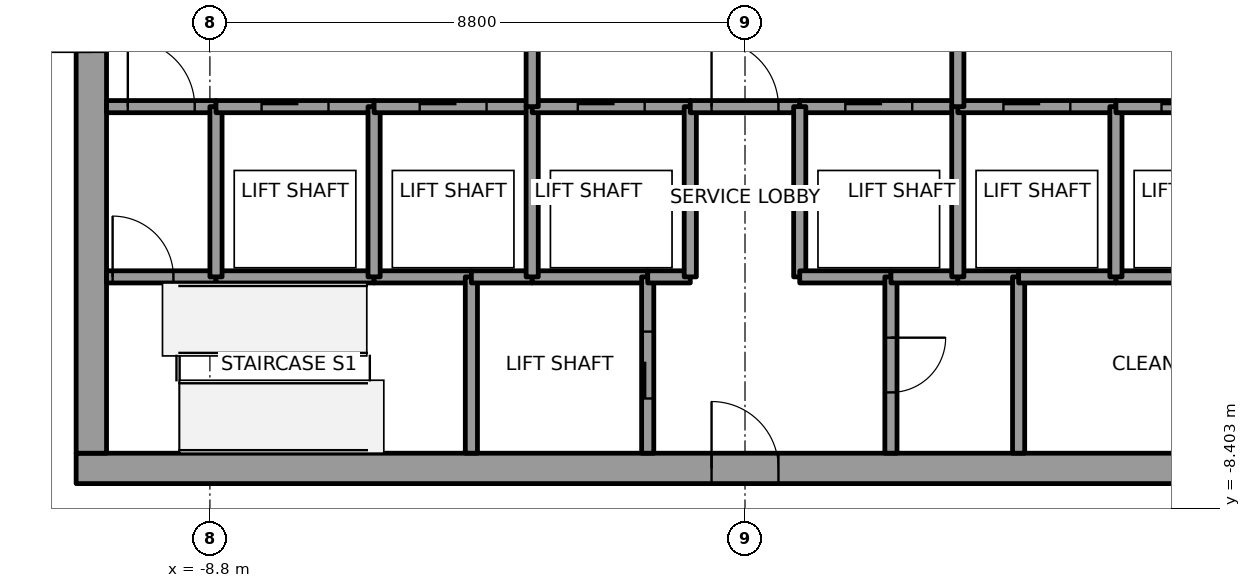
"""IFC4 building model, lengths in metres.
Left out: names, types, materials, properties, quantities, classifications, styles, units other than length and angle.
Written with IfcOpenShell. Run it as: python <this file> out.ifc"""

import sys

from ifc_helpers import new_model, si_unit, direction, frame, frame_2d, origin, place, context, subcontext, project, spatial, rectangle, extrude, element, fill, save


model = new_model("IFC4")
c1 = context("Model", 3, precision=1e-05, world=origin(), true_north=direction((0.0, 1.0)))
c2 = subcontext(c1, "Body", "Model", "MODEL_VIEW")
j1 = project(units=[si_unit("LENGTHUNIT", "METRE"), si_unit("PLANEANGLEUNIT", "RADIAN")], contexts=[c1])
p1 = place(None, origin())
s1 = spatial("IfcSite", under=j1, at=p1, CompositionType="ELEMENT")
p2 = place(p1, origin())
s2 = spatial("IfcBuilding", under=s1, at=p2, CompositionType="ELEMENT")
p3 = place(p2, frame((0.0, 0.0, 295.0)))
s3 = spatial("IfcBuildingStorey", under=s2, at=p3, CompositionType="ELEMENT", Elevation=295.0)
p4 = place(p3, frame((-11.0, -7.75, 0.0), z_axis=(0.0, 0.0, 1.0), x_axis=(1.0, 0.0, 0.0)))
e1 = element("IfcWall", 1, at=p4, inside=s3, PredefinedType="SHEAR", context=c2, shape_type="SweptSolid", body=[
    extrude(rectangle(XDim=22.0, YDim=0.5, at=frame_2d((11.0, 0.0))), origin(), (0.0, 0.0, 1.0), 4.0),
])
p5 = place(p4, frame((10.45, 0.0, 0.0)))
e2 = element("IfcOpeningElement", 2, at=p5, cuts=e1, PredefinedType="OPENING", context=c2, shape_type="SweptSolid", body=[
    extrude(rectangle(XDim=1.1, YDim=2.1, at=frame_2d((0.55, 1.05))), frame((0.0, 0.25, 0.0), z_axis=(0.0, -1.0, 0.0), x_axis=(1.0, 0.0, 0.0)), (0.0, 0.0, 1.0), 0.5),
])
p6 = place(p3, frame((-10.75, -7.5, 0.0), z_axis=(0.0, 0.0, 1.0), x_axis=(0.0, 1.0, 0.0)))
e3 = element("IfcWall", 3, at=p6, inside=s3, PredefinedType="SHEAR", context=c2, shape_type="SweptSolid", body=[
    extrude(rectangle(XDim=15.0, YDim=0.5, at=frame_2d((7.5, 0.0))), origin(), (0.0, 0.0, 1.0), 4.0),
])
p7 = place(p6, frame((6.6, 0.0, 0.0)))
e4 = element("IfcOpeningElement", 4, at=p7, cuts=e3, PredefinedType="OPENING", context=c2, shape_type="SweptSolid", body=[
    extrude(rectangle(XDim=1.8, YDim=2.1, at=frame_2d((0.9, 1.05))), frame((0.0, 0.25, 0.0), z_axis=(0.0, -1.0, 0.0), x_axis=(1.0, 0.0, 0.0)), (0.0, 0.0, 1.0), 0.5),
])
p8 = place(p3, frame((-10.5, -4.6, 0.0), z_axis=(0.0, 0.0, 1.0), x_axis=(1.0, 0.0, 0.0)))
e5 = element("IfcWall", 5, at=p8, inside=s3, PredefinedType="SOLIDWALL", context=c2, shape_type="SweptSolid", body=[
    extrude(rectangle(XDim=1.8, YDim=0.2, at=frame_2d((0.9, 0.0))), origin(), (0.0, 0.0, 1.0), 3.85),
])
p9 = place(p8, frame((0.1, 0.0, 0.0)))
e6 = element("IfcOpeningElement", 6, at=p9, cuts=e5, PredefinedType="OPENING", context=c2, shape_type="SweptSolid", body=[
    extrude(rectangle(XDim=1.0, YDim=2.1, at=frame_2d((0.5, 1.05))), frame((0.0, 0.1, 0.0), z_axis=(0.0, -1.0, 0.0), x_axis=(1.0, 0.0, 0.0)), (0.0, 0.0, 1.0), 0.2),
])
p10 = place(p3, frame((-10.5, -1.8, 0.0), z_axis=(0.0, 0.0, 1.0), x_axis=(1.0, 0.0, 0.0)))
e7 = element("IfcWall", 7, at=p10, inside=s3, PredefinedType="SOLIDWALL", context=c2, shape_type="SweptSolid", body=[
    extrude(rectangle(XDim=1.8, YDim=0.2, at=frame_2d((0.9, 0.0))), origin(), (0.0, 0.0, 1.0), 3.85),
])
p11 = place(p10, frame((0.35, 0.0, 0.0)))
e8 = element("IfcOpeningElement", 8, at=p11, cuts=e7, PredefinedType="OPENING", context=c2, shape_type="SweptSolid", body=[
    extrude(rectangle(XDim=1.1, YDim=2.1, at=frame_2d((0.55, 1.05))), frame((0.0, 0.1, 0.0), z_axis=(0.0, -1.0, 0.0), x_axis=(1.0, 0.0, 0.0)), (0.0, 0.0, 1.0), 0.2),
])
p12 = place(p3, frame((-8.7, -4.6, 0.0), z_axis=(0.0, 0.0, 1.0), x_axis=(1.0, 0.0, 0.0)))
e9 = element("IfcWall", 9, at=p12, inside=s3, PredefinedType="SOLIDWALL", context=c2, shape_type="SweptSolid", body=[
    extrude(rectangle(XDim=2.6, YDim=0.2, at=frame_2d((1.3, 0.0))), origin(), (0.0, 0.0, 1.0), 3.85),
])
p13 = place(p3, frame((-8.7, -4.6, 0.0), z_axis=(0.0, 0.0, 1.0), x_axis=(0.0, 1.0, 0.0)))
e10 = element("IfcWall", 10, at=p13, inside=s3, PredefinedType="SOLIDWALL", context=c2, shape_type="SweptSolid", body=[
    extrude(rectangle(XDim=2.8, YDim=0.2, at=frame_2d((1.4, 0.0))), origin(), (0.0, 0.0, 1.0), 3.85),
])
p14 = place(p3, frame((-8.7, -1.8, 0.0), z_axis=(0.0, 0.0, 1.0), x_axis=(1.0, 0.0, 0.0)))
e11 = element("IfcWall", 11, at=p14, inside=s3, PredefinedType="SOLIDWALL", context=c2, shape_type="SweptSolid", body=[
    extrude(rectangle(XDim=2.6, YDim=0.2, at=frame_2d((1.3, 0.0))), origin(), (0.0, 0.0, 1.0), 3.85),
])
p15 = place(p14, frame((0.75, 0.0, 0.0)))
e12 = element("IfcOpeningElement", 12, at=p15, cuts=e11, PredefinedType="OPENING", context=c2, shape_type="SweptSolid", body=[
    extrude(rectangle(XDim=1.1, YDim=2.1, at=frame_2d((0.55, 1.05))), frame((0.0, 0.1, 0.0), z_axis=(0.0, -1.0, 0.0), x_axis=(1.0, 0.0, 0.0)), (0.0, 0.0, 1.0), 0.2),
])
p16 = place(p3, frame((-6.1, -4.6, 0.0), z_axis=(0.0, 0.0, 1.0), x_axis=(1.0, 0.0, 0.0)))
e13 = element("IfcWall", 13, at=p16, inside=s3, PredefinedType="SOLIDWALL", context=c2, shape_type="SweptSolid", body=[
    extrude(rectangle(XDim=1.6, YDim=0.2, at=frame_2d((0.8, 0.0))), origin(), (0.0, 0.0, 1.0), 3.85),
])
p17 = place(p3, frame((-6.1, -4.6, 0.0), z_axis=(0.0, 0.0, 1.0), x_axis=(0.0, 1.0, 0.0)))
e14 = element("IfcWall", 14, at=p17, inside=s3, PredefinedType="SOLIDWALL", context=c2, shape_type="SweptSolid", body=[
    extrude(rectangle(XDim=2.8, YDim=0.2, at=frame_2d((1.4, 0.0))), origin(), (0.0, 0.0, 1.0), 3.85),
])
p18 = place(p3, frame((-6.1, -1.8, 0.0), z_axis=(0.0, 0.0, 1.0), x_axis=(1.0, 0.0, 0.0)))
e15 = element("IfcWall", 15, at=p18, inside=s3, PredefinedType="SOLIDWALL", context=c2, shape_type="SweptSolid", body=[
    extrude(rectangle(XDim=2.6, YDim=0.2, at=frame_2d((1.3, 0.0))), origin(), (0.0, 0.0, 1.0), 3.85),
])
p19 = place(p18, frame((0.75, 0.0, 0.0)))
e16 = element("IfcOpeningElement", 16, at=p19, cuts=e15, PredefinedType="OPENING", context=c2, shape_type="SweptSolid", body=[
    extrude(rectangle(XDim=1.1, YDim=2.1, at=frame_2d((0.55, 1.05))), frame((0.0, 0.1, 0.0), z_axis=(0.0, -1.0, 0.0), x_axis=(1.0, 0.0, 0.0)), (0.0, 0.0, 1.0), 0.2),
])
p20 = place(p3, frame((-4.5, -4.6, 0.0), z_axis=(0.0, 0.0, 1.0), x_axis=(0.0, -1.0, 0.0)))
e17 = element("IfcWall", 17, at=p20, inside=s3, PredefinedType="SOLIDWALL", context=c2, shape_type="SweptSolid", body=[
    extrude(rectangle(XDim=2.9, YDim=0.2, at=frame_2d((1.45, 0.0))), origin(), (0.0, 0.0, 1.0), 3.85),
])
p21 = place(p3, frame((-4.5, -4.6, 0.0), z_axis=(0.0, 0.0, 1.0), x_axis=(1.0, 0.0, 0.0)))
e18 = element("IfcWall", 18, at=p21, inside=s3, PredefinedType="SOLIDWALL", context=c2, shape_type="SweptSolid", body=[
    extrude(rectangle(XDim=1.0, YDim=0.2, at=frame_2d((0.5, 0.0))), origin(), (0.0, 0.0, 1.0), 3.85),
])
p22 = place(p3, frame((-3.5, -4.6, 0.0), z_axis=(0.0, 0.0, 1.0), x_axis=(1.0, 0.0, 0.0)))
e19 = element("IfcWall", 19, at=p22, inside=s3, PredefinedType="SOLIDWALL", context=c2, shape_type="SweptSolid", body=[
    extrude(rectangle(XDim=1.9, YDim=0.2, at=frame_2d((0.95, 0.0))), origin(), (0.0, 0.0, 1.0), 3.85),
])
p23 = place(p3, frame((-3.5, -4.6, 0.0), z_axis=(0.0, 0.0, 1.0), x_axis=(0.0, 1.0, 0.0)))
e20 = element("IfcWall", 20, at=p23, inside=s3, PredefinedType="SOLIDWALL", context=c2, shape_type="SweptSolid", body=[
    extrude(rectangle(XDim=2.8, YDim=0.2, at=frame_2d((1.4, 0.0))), origin(), (0.0, 0.0, 1.0), 3.85),
])
p24 = place(p3, frame((-3.5, -1.8, 0.0), z_axis=(0.0, 0.0, 1.0), x_axis=(1.0, 0.0, 0.0)))
e21 = element("IfcWall", 21, at=p24, inside=s3, PredefinedType="SOLIDWALL", context=c2, shape_type="SweptSolid", body=[
    extrude(rectangle(XDim=2.6, YDim=0.2, at=frame_2d((1.3, 0.0))), origin(), (0.0, 0.0, 1.0), 3.85),
])
p25 = place(p24, frame((0.75, 0.0, 0.0)))
e22 = element("IfcOpeningElement", 22, at=p25, cuts=e21, PredefinedType="OPENING", context=c2, shape_type="SweptSolid", body=[
    extrude(rectangle(XDim=1.1, YDim=2.1, at=frame_2d((0.55, 1.05))), frame((0.0, 0.1, 0.0), z_axis=(0.0, -1.0, 0.0), x_axis=(1.0, 0.0, 0.0)), (0.0, 0.0, 1.0), 0.2),
])
p26 = place(p3, frame((-3.5, 1.8, 0.0), z_axis=(0.0, 0.0, 1.0), x_axis=(0.0, -1.0, 0.0)))
e23 = element("IfcWall", 23, at=p26, inside=s3, PredefinedType="SOLIDWALL", context=c2, shape_type="SweptSolid", body=[
    extrude(rectangle(XDim=3.6, YDim=0.2, at=frame_2d((1.8, 0.0))), origin(), (0.0, 0.0, 1.0), 3.85),
])
p27 = place(p26, frame((1.05, 0.0, 0.0)))
e24 = element("IfcOpeningElement", 24, at=p27, cuts=e23, PredefinedType="OPENING", context=c2, shape_type="SweptSolid", body=[
    extrude(rectangle(XDim=1.5, YDim=2.1, at=frame_2d((0.75, 1.05))), frame((0.0, 0.1, 0.0), z_axis=(0.0, -1.0, 0.0), x_axis=(1.0, 0.0, 0.0)), (0.0, 0.0, 1.0), 0.2),
])
p28 = place(p3, frame((-1.6, -7.5, 0.0), z_axis=(0.0, 0.0, 1.0), x_axis=(0.0, 1.0, 0.0)))
e25 = element("IfcWall", 25, at=p28, inside=s3, PredefinedType="SOLIDWALL", context=c2, shape_type="SweptSolid", body=[
    extrude(rectangle(XDim=2.9, YDim=0.2, at=frame_2d((1.45, 0.0))), origin(), (0.0, 0.0, 1.0), 3.85),
])
p29 = place(p28, frame((0.9, 0.0, 0.0)))
e26 = element("IfcOpeningElement", 26, at=p29, cuts=e25, PredefinedType="OPENING", context=c2, shape_type="SweptSolid", body=[
    extrude(rectangle(XDim=1.1, YDim=2.1, at=frame_2d((0.55, 1.05))), frame((0.0, 0.1, 0.0), z_axis=(0.0, -1.0, 0.0), x_axis=(1.0, 0.0, 0.0)), (0.0, 0.0, 1.0), 0.2),
])
p30 = place(p3, frame((-1.6, -4.6, 0.0), z_axis=(0.0, 0.0, 1.0), x_axis=(1.0, 0.0, 0.0)))
e27 = element("IfcWall", 27, at=p30, inside=s3, PredefinedType="SOLIDWALL", context=c2, shape_type="SweptSolid", body=[
    extrude(rectangle(XDim=0.7, YDim=0.2, at=frame_2d((0.35, 0.0))), origin(), (0.0, 0.0, 1.0), 3.85),
])
p31 = place(p3, frame((-0.9, -4.6, 0.0), z_axis=(0.0, 0.0, 1.0), x_axis=(0.0, 1.0, 0.0)))
e28 = element("IfcWall", 28, at=p31, inside=s3, PredefinedType="SOLIDWALL", context=c2, shape_type="SweptSolid", body=[
    extrude(rectangle(XDim=2.8, YDim=0.2, at=frame_2d((1.4, 0.0))), origin(), (0.0, 0.0, 1.0), 3.85),
])
p32 = place(p3, frame((-0.9, -1.8, 0.0), z_axis=(0.0, 0.0, 1.0), x_axis=(1.0, 0.0, 0.0)))
e29 = element("IfcWall", 29, at=p32, inside=s3, PredefinedType="SOLIDWALL", context=c2, shape_type="SweptSolid", body=[
    extrude(rectangle(XDim=1.8, YDim=0.2, at=frame_2d((0.9, 0.0))), origin(), (0.0, 0.0, 1.0), 3.85),
])
p33 = place(p32, frame((0.35, 0.0, 0.0)))
e30 = element("IfcOpeningElement", 30, at=p33, cuts=e29, PredefinedType="OPENING", context=c2, shape_type="SweptSolid", body=[
    extrude(rectangle(XDim=1.1, YDim=2.1, at=frame_2d((0.55, 1.05))), frame((0.0, 0.1, 0.0), z_axis=(0.0, -1.0, 0.0), x_axis=(1.0, 0.0, 0.0)), (0.0, 0.0, 1.0), 0.2),
])
p34 = place(p3, frame((0.9, -1.8, 0.0), z_axis=(0.0, 0.0, 1.0), x_axis=(1.0, 0.0, 0.0)))
e31 = element("IfcWall", 31, at=p34, inside=s3, PredefinedType="SOLIDWALL", context=c2, shape_type="SweptSolid", body=[
    extrude(rectangle(XDim=2.6, YDim=0.2, at=frame_2d((1.3, 0.0))), origin(), (0.0, 0.0, 1.0), 3.85),
])
p35 = place(p34, frame((0.75, 0.0, 0.0)))
e32 = element("IfcOpeningElement", 32, at=p35, cuts=e31, PredefinedType="OPENING", context=c2, shape_type="SweptSolid", body=[
    extrude(rectangle(XDim=1.1, YDim=2.1, at=frame_2d((0.55, 1.05))), frame((0.0, 0.1, 0.0), z_axis=(0.0, -1.0, 0.0), x_axis=(1.0, 0.0, 0.0)), (0.0, 0.0, 1.0), 0.2),
])
p36 = place(p3, frame((0.9, -1.8, 0.0), z_axis=(0.0, 0.0, 1.0), x_axis=(0.0, -1.0, 0.0)))
e33 = element("IfcWall", 33, at=p36, inside=s3, PredefinedType="SOLIDWALL", context=c2, shape_type="SweptSolid", body=[
    extrude(rectangle(XDim=2.8, YDim=0.2, at=frame_2d((1.4, 0.0))), origin(), (0.0, 0.0, 1.0), 3.85),
])
p37 = place(p3, frame((0.9, -4.6, 0.0), z_axis=(0.0, 0.0, 1.0), x_axis=(1.0, 0.0, 0.0)))
e34 = element("IfcWall", 34, at=p37, inside=s3, PredefinedType="SOLIDWALL", context=c2, shape_type="SweptSolid", body=[
    extrude(rectangle(XDim=1.5, YDim=0.2, at=frame_2d((0.75, 0.0))), origin(), (0.0, 0.0, 1.0), 3.85),
])
p38 = place(p3, frame((2.4, -4.6, 0.0), z_axis=(0.0, 0.0, 1.0), x_axis=(0.0, -1.0, 0.0)))
e35 = element("IfcWall", 35, at=p38, inside=s3, PredefinedType="SOLIDWALL", context=c2, shape_type="SweptSolid", body=[
    extrude(rectangle(XDim=2.9, YDim=0.2, at=frame_2d((1.45, 0.0))), origin(), (0.0, 0.0, 1.0), 3.85),
])
p39 = place(p38, frame((1.0, 0.0, 0.0)))
e36 = element("IfcOpeningElement", 36, at=p39, cuts=e35, PredefinedType="OPENING", context=c2, shape_type="SweptSolid", body=[
    extrude(rectangle(XDim=0.9, YDim=2.1, at=frame_2d((0.45, 1.05))), frame((0.0, 0.1, 0.0), z_axis=(0.0, -1.0, 0.0), x_axis=(1.0, 0.0, 0.0)), (0.0, 0.0, 1.0), 0.2),
])
p40 = place(p3, frame((3.5, -4.6, 0.0), z_axis=(0.0, 0.0, 1.0), x_axis=(-1.0, 0.0, 0.0)))
e37 = element("IfcWall", 37, at=p40, inside=s3, PredefinedType="SOLIDWALL", context=c2, shape_type="SweptSolid", body=[
    extrude(rectangle(XDim=1.1, YDim=0.2, at=frame_2d((0.55, 0.0))), origin(), (0.0, 0.0, 1.0), 3.85),
])
p41 = place(p3, frame((4.5, -4.6, 0.0), z_axis=(0.0, 0.0, 1.0), x_axis=(-1.0, 0.0, 0.0)))
e38 = element("IfcWall", 38, at=p41, inside=s3, PredefinedType="SOLIDWALL", context=c2, shape_type="SweptSolid", body=[
    extrude(rectangle(XDim=1.0, YDim=0.2, at=frame_2d((0.5, 0.0))), origin(), (0.0, 0.0, 1.0), 3.85),
])
p42 = place(p3, frame((3.5, -4.6, 0.0), z_axis=(0.0, 0.0, 1.0), x_axis=(0.0, 1.0, 0.0)))
e39 = element("IfcWall", 39, at=p42, inside=s3, PredefinedType="SOLIDWALL", context=c2, shape_type="SweptSolid", body=[
    extrude(rectangle(XDim=2.8, YDim=0.2, at=frame_2d((1.4, 0.0))), origin(), (0.0, 0.0, 1.0), 3.85),
])
p43 = place(p3, frame((3.5, -1.8, 0.0), z_axis=(0.0, 0.0, 1.0), x_axis=(1.0, 0.0, 0.0)))
e40 = element("IfcWall", 40, at=p43, inside=s3, PredefinedType="SOLIDWALL", context=c2, shape_type="SweptSolid", body=[
    extrude(rectangle(XDim=2.6, YDim=0.2, at=frame_2d((1.3, 0.0))), origin(), (0.0, 0.0, 1.0), 3.85),
])
p44 = place(p43, frame((0.75, 0.0, 0.0)))
e41 = element("IfcOpeningElement", 41, at=p44, cuts=e40, PredefinedType="OPENING", context=c2, shape_type="SweptSolid", body=[
    extrude(rectangle(XDim=1.1, YDim=2.1, at=frame_2d((0.55, 1.05))), frame((0.0, 0.1, 0.0), z_axis=(0.0, -1.0, 0.0), x_axis=(1.0, 0.0, 0.0)), (0.0, 0.0, 1.0), 0.2),
])
p45 = place(p3, frame((3.5, -1.8, 0.0), z_axis=(0.0, 0.0, 1.0), x_axis=(0.0, 1.0, 0.0)))
e42 = element("IfcWall", 42, at=p45, inside=s3, PredefinedType="SOLIDWALL", context=c2, shape_type="SweptSolid", body=[
    extrude(rectangle(XDim=3.6, YDim=0.2, at=frame_2d((1.8, 0.0))), origin(), (0.0, 0.0, 1.0), 3.85),
])
p46 = place(p45, frame((1.05, 0.0, 0.0)))
e43 = element("IfcOpeningElement", 43, at=p46, cuts=e42, PredefinedType="OPENING", context=c2, shape_type="SweptSolid", body=[
    extrude(rectangle(XDim=1.5, YDim=2.1, at=frame_2d((0.75, 1.05))), frame((0.0, 0.1, 0.0), z_axis=(0.0, -1.0, 0.0), x_axis=(1.0, 0.0, 0.0)), (0.0, 0.0, 1.0), 0.2),
])
p47 = place(p3, frame((4.5, -4.6, 0.0), z_axis=(0.0, 0.0, 1.0), x_axis=(0.0, -1.0, 0.0)))
e44 = element("IfcWall", 44, at=p47, inside=s3, PredefinedType="SOLIDWALL", context=c2, shape_type="SweptSolid", body=[
    extrude(rectangle(XDim=2.9, YDim=0.2, at=frame_2d((1.45, 0.0))), origin(), (0.0, 0.0, 1.0), 3.85),
])
p48 = place(p3, frame((6.1, -4.6, 0.0), z_axis=(0.0, 0.0, 1.0), x_axis=(-1.0, 0.0, 0.0)))
e45 = element("IfcWall", 45, at=p48, inside=s3, PredefinedType="SOLIDWALL", context=c2, shape_type="SweptSolid", body=[
    extrude(rectangle(XDim=1.6, YDim=0.2, at=frame_2d((0.8, 0.0))), origin(), (0.0, 0.0, 1.0), 3.85),
])
p49 = place(p3, frame((8.7, -4.6, 0.0), z_axis=(0.0, 0.0, 1.0), x_axis=(-1.0, 0.0, 0.0)))
e46 = element("IfcWall", 46, at=p49, inside=s3, PredefinedType="SOLIDWALL", context=c2, shape_type="SweptSolid", body=[
    extrude(rectangle(XDim=2.6, YDim=0.2, at=frame_2d((1.3, 0.0))), origin(), (0.0, 0.0, 1.0), 3.85),
])
p50 = place(p3, frame((6.1, -4.6, 0.0), z_axis=(0.0, 0.0, 1.0), x_axis=(0.0, 1.0, 0.0)))
e47 = element("IfcWall", 47, at=p50, inside=s3, PredefinedType="SOLIDWALL", context=c2, shape_type="SweptSolid", body=[
    extrude(rectangle(XDim=2.8, YDim=0.2, at=frame_2d((1.4, 0.0))), origin(), (0.0, 0.0, 1.0), 3.85),
])
p51 = place(p3, frame((6.1, -1.8, 0.0), z_axis=(0.0, 0.0, 1.0), x_axis=(1.0, 0.0, 0.0)))
e48 = element("IfcWall", 48, at=p51, inside=s3, PredefinedType="SOLIDWALL", context=c2, shape_type="SweptSolid", body=[
    extrude(rectangle(XDim=2.6, YDim=0.2, at=frame_2d((1.3, 0.0))), origin(), (0.0, 0.0, 1.0), 3.85),
])
p52 = place(p51, frame((0.75, 0.0, 0.0)))
e49 = element("IfcOpeningElement", 49, at=p52, cuts=e48, PredefinedType="OPENING", context=c2, shape_type="SweptSolid", body=[
    extrude(rectangle(XDim=1.1, YDim=2.1, at=frame_2d((0.55, 1.05))), frame((0.0, 0.1, 0.0), z_axis=(0.0, -1.0, 0.0), x_axis=(1.0, 0.0, 0.0)), (0.0, 0.0, 1.0), 0.2),
])
p53 = place(p15, origin())
e50 = element("IfcDoor", 50, at=p53, inside=s3, OperationType="SLIDING_TO_LEFT", PredefinedType="DOOR", context=c2, shape_type="SweptSolid", body=[
    extrude(rectangle(XDim=1.1, YDim=2.1, at=frame_2d((0.55, 1.05))), frame((0.0, 0.025, 0.0), z_axis=(0.0, -1.0, 0.0), x_axis=(1.0, 0.0, 0.0)), (0.0, 0.0, 1.0), 0.05),
])
fill(e12, e50)
p54 = place(p19, origin())
e51 = element("IfcDoor", 51, at=p54, inside=s3, OperationType="SLIDING_TO_RIGHT", PredefinedType="DOOR", context=c2, shape_type="SweptSolid", body=[
    extrude(rectangle(XDim=1.1, YDim=2.1, at=frame_2d((0.55, 1.05))), frame((0.0, 0.025, 0.0), z_axis=(0.0, -1.0, 0.0), x_axis=(1.0, 0.0, 0.0)), (0.0, 0.0, 1.0), 0.05),
])
fill(e16, e51)
p55 = place(p25, origin())
e52 = element("IfcDoor", 52, at=p55, inside=s3, OperationType="SLIDING_TO_RIGHT", PredefinedType="DOOR", context=c2, shape_type="SweptSolid", body=[
    extrude(rectangle(XDim=1.1, YDim=2.1, at=frame_2d((0.55, 1.05))), frame((0.0, 0.025, 0.0), z_axis=(0.0, -1.0, 0.0), x_axis=(1.0, 0.0, 0.0)), (0.0, 0.0, 1.0), 0.05),
])
fill(e22, e52)
p56 = place(p35, origin())
e53 = element("IfcDoor", 53, at=p56, inside=s3, OperationType="SLIDING_TO_LEFT", PredefinedType="DOOR", context=c2, shape_type="SweptSolid", body=[
    extrude(rectangle(XDim=1.1, YDim=2.1, at=frame_2d((0.55, 1.05))), frame((0.0, 0.025, 0.0), z_axis=(0.0, -1.0, 0.0), x_axis=(1.0, 0.0, 0.0)), (0.0, 0.0, 1.0), 0.05),
])
fill(e32, e53)
p57 = place(p44, origin())
e54 = element("IfcDoor", 54, at=p57, inside=s3, OperationType="SLIDING_TO_LEFT", PredefinedType="DOOR", context=c2, shape_type="SweptSolid", body=[
    extrude(rectangle(XDim=1.1, YDim=2.1, at=frame_2d((0.55, 1.05))), frame((0.0, 0.025, 0.0), z_axis=(0.0, -1.0, 0.0), x_axis=(1.0, 0.0, 0.0)), (0.0, 0.0, 1.0), 0.05),
])
fill(e41, e54)
p58 = place(p52, origin())
e55 = element("IfcDoor", 55, at=p58, inside=s3, OperationType="SLIDING_TO_LEFT", PredefinedType="DOOR", context=c2, shape_type="SweptSolid", body=[
    extrude(rectangle(XDim=1.1, YDim=2.1, at=frame_2d((0.55, 1.05))), frame((0.0, 0.025, 0.0), z_axis=(0.0, -1.0, 0.0), x_axis=(1.0, 0.0, 0.0)), (0.0, 0.0, 1.0), 0.05),
])
fill(e49, e55)
p59 = place(p29, origin())
e56 = element("IfcDoor", 56, at=p59, inside=s3, OperationType="SLIDING_TO_RIGHT", PredefinedType="DOOR", context=c2, shape_type="SweptSolid", body=[
    extrude(rectangle(XDim=1.1, YDim=2.1, at=frame_2d((0.55, 1.05))), frame((0.0, 0.025, 0.0), z_axis=(0.0, -1.0, 0.0), x_axis=(1.0, 0.0, 0.0)), (0.0, 0.0, 1.0), 0.05),
])
fill(e26, e56)
p60 = place(p11, origin())
e57 = element("IfcDoor", 57, at=p60, inside=s3, OperationType="SINGLE_SWING_LEFT", PredefinedType="DOOR", context=c2, shape_type="SweptSolid", body=[
    extrude(rectangle(XDim=1.1, YDim=2.1, at=frame_2d((0.55, 1.05))), frame((0.0, 0.025, 0.0), z_axis=(0.0, -1.0, 0.0), x_axis=(1.0, 0.0, 0.0)), (0.0, 0.0, 1.0), 0.05),
])
fill(e8, e57)
p61 = place(p33, origin())
e58 = element("IfcDoor", 58, at=p61, inside=s3, OperationType="SINGLE_SWING_RIGHT", PredefinedType="DOOR", context=c2, shape_type="SweptSolid", body=[
    extrude(rectangle(XDim=1.1, YDim=2.1, at=frame_2d((0.55, 1.05))), frame((0.0, 0.025, 0.0), z_axis=(0.0, -1.0, 0.0), x_axis=(1.0, 0.0, 0.0)), (0.0, 0.0, 1.0), 0.05),
])
fill(e30, e58)
p62 = place(p9, origin())
e59 = element("IfcDoor", 59, at=p62, inside=s3, OperationType="SINGLE_SWING_LEFT", PredefinedType="DOOR", context=c2, shape_type="SweptSolid", body=[
    extrude(rectangle(XDim=1.0, YDim=2.1, at=frame_2d((0.5, 1.05))), frame((0.0, 0.025, 0.0), z_axis=(0.0, -1.0, 0.0), x_axis=(1.0, 0.0, 0.0)), (0.0, 0.0, 1.0), 0.05),
])
fill(e6, e59)
p63 = place(p39, origin())
e60 = element("IfcDoor", 60, at=p63, inside=s3, OperationType="SINGLE_SWING_RIGHT", PredefinedType="DOOR", context=c2, shape_type="SweptSolid", body=[
    extrude(rectangle(XDim=0.9, YDim=2.1, at=frame_2d((0.45, 1.05))), frame((0.0, 0.025, 0.0), z_axis=(0.0, -1.0, 0.0), x_axis=(1.0, 0.0, 0.0)), (0.0, 0.0, 1.0), 0.05),
])
fill(e36, e60)
p64 = place(p7, origin())
e61 = element("IfcDoor", 61, at=p64, inside=s3, OperationType="DOUBLE_DOOR_SINGLE_SWING", PredefinedType="DOOR", context=c2, shape_type="SweptSolid", body=[
    extrude(rectangle(XDim=1.8, YDim=2.1, at=frame_2d((0.9, 1.05))), frame((0.0, 0.025, 0.0), z_axis=(0.0, -1.0, 0.0), x_axis=(1.0, 0.0, 0.0)), (0.0, 0.0, 1.0), 0.05),
])
fill(e4, e61)
p65 = place(p5, origin())
e62 = element("IfcDoor", 62, at=p65, inside=s3, OperationType="SINGLE_SWING_RIGHT", PredefinedType="DOOR", context=c2, shape_type="SweptSolid", body=[
    extrude(rectangle(XDim=1.1, YDim=2.1, at=frame_2d((0.55, 1.05))), frame((0.0, 0.025, 0.0), z_axis=(0.0, -1.0, 0.0), x_axis=(1.0, 0.0, 0.0)), (0.0, 0.0, 1.0), 0.05),
])
fill(e2, e62)
save(model, sys.argv[1])
